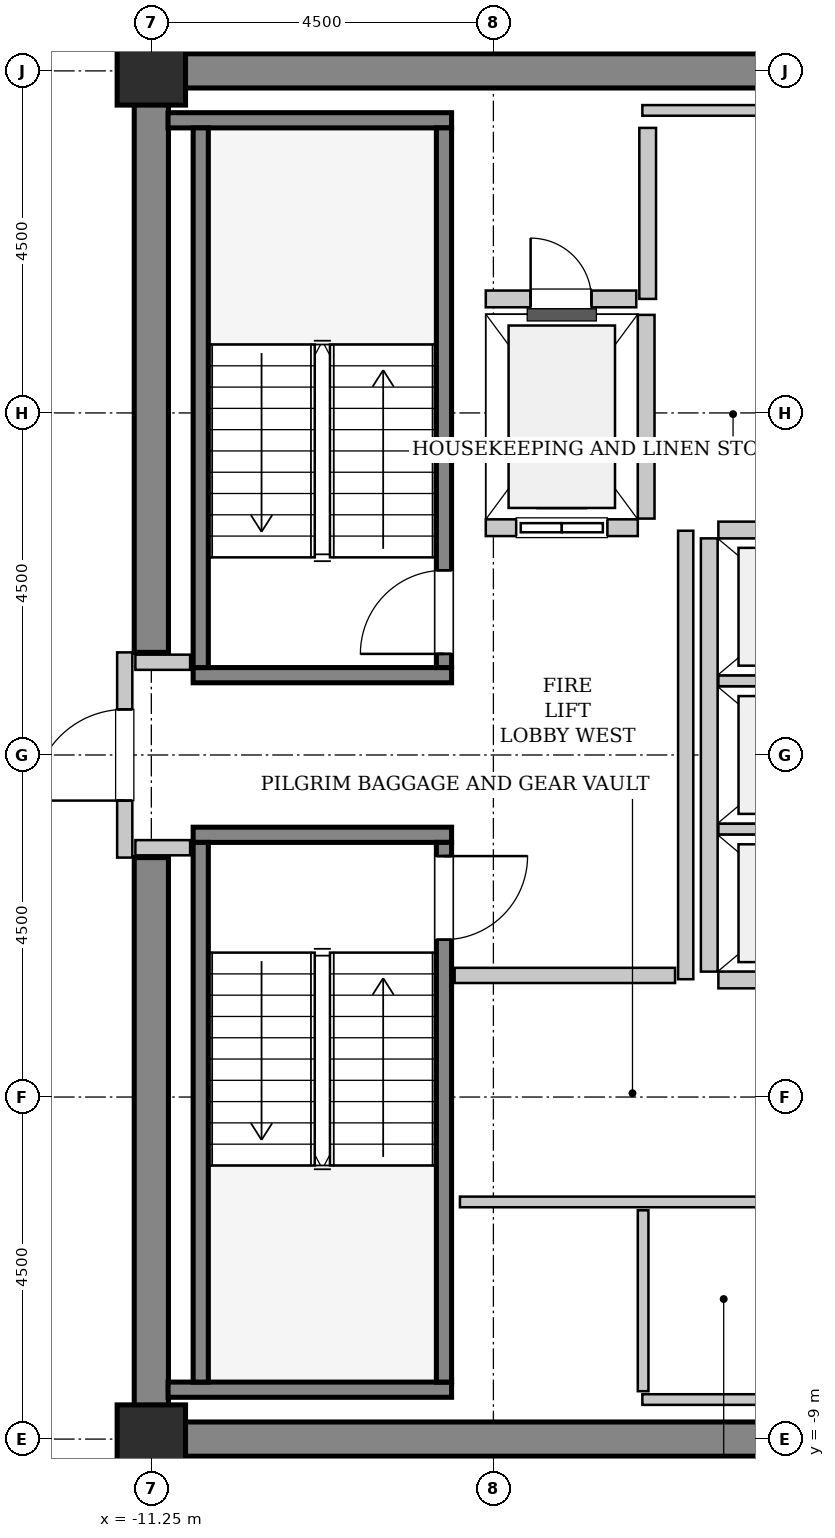
"""IFC4 building model, lengths in metres.
Left out: names, types, materials, properties, quantities, classifications, styles, units other than length and angle.
Written with IfcOpenShell. Run it as: python <this file> out.ifc"""

import sys

from ifc_helpers import new_model, si_unit, direction, frame, frame_2d, origin, origin_2d, place, context, subcontext, project, spatial, rectangle, extrude, source, transform, mapped, element, fill, save


model = new_model("IFC4")
c1 = context("Model", 3, precision=1e-05, world=origin(), true_north=direction((0.0, 1.0)))
c2 = subcontext(c1, "Body", "Model", "MODEL_VIEW")
j1 = project(units=[si_unit("LENGTHUNIT", "METRE"), si_unit("PLANEANGLEUNIT", "RADIAN")], contexts=[c1])
p1 = place(None, origin())
s1 = spatial("IfcSite", under=j1, at=p1, CompositionType="ELEMENT")
p2 = place(p1, origin())
s2 = spatial("IfcBuilding", under=s1, at=p2, CompositionType="ELEMENT")
p3 = place(p2, frame((0.0, 0.0, 306.4)))
s3 = spatial("IfcBuildingStorey", under=s2, at=p3, CompositionType="ELEMENT", Elevation=306.4)
m1 = source(origin(), c2, "Body", "SweptSolid", [
    extrude(rectangle(XDim=9.925, YDim=0.45, at=frame_2d((4.962, 0.0))), origin(), (0.0, 0.0, 1.0), 3.8),
])
for number, where, z_axis, x_axis in (
    (1, (-11.475, 9.0, 0.0), (0.0, 0.0, 1.0), (1.0, 0.0, 0.0)),
    (2, (-11.475, -9.0, 0.0), (0.0, 0.0, 1.0), (1.0, 0.0, 0.0)),
):
    element("IfcWall", number, at=place(p3, frame(where, z_axis=z_axis, x_axis=x_axis)), inside=s3, PredefinedType="SHEAR", context=c2, shape_type="MappedRepresentation", body=[
        mapped(m1, transform((0.0, 0.0, 0.0), x_axis=(1.0, 0.0, 0.0), y_axis=(0.0, 1.0, 0.0), z_axis=(0.0, 0.0, 1.0), scale=1.0)),
    ])
m2 = source(origin(), c2, "Body", "SweptSolid", [
    extrude(rectangle(XDim=7.425, YDim=0.45, at=frame_2d((3.712, 0.0))), origin(), (0.0, 0.0, 1.0), 3.8),
])
for number, where, z_axis, x_axis in (
    (3, (-11.25, -8.775, 0.0), (0.0, 0.0, 1.0), (0.0, 1.0, 0.0)),
    (4, (-11.25, 1.35, 0.0), (0.0, 0.0, 1.0), (0.0, 1.0, 0.0)),
):
    element("IfcWall", number, at=place(p3, frame(where, z_axis=z_axis, x_axis=x_axis)), inside=s3, PredefinedType="SHEAR", context=c2, shape_type="MappedRepresentation", body=[
        mapped(m2, transform((0.0, 0.0, 0.0), x_axis=(1.0, 0.0, 0.0), y_axis=(0.0, 1.0, 0.0), z_axis=(0.0, 0.0, 1.0), scale=1.0)),
    ])
m3 = source(origin(), c2, "Body", "SweptSolid", [
    extrude(rectangle(XDim=0.9, YDim=0.9, at=origin_2d()), origin(), (0.0, 0.0, 1.0), 3.8),
])
for number, where, z_axis, x_axis in (
    (5, (-11.25, -9.0, 0.0), (0.0, 0.0, 1.0), (1.0, 0.0, 0.0)),
    (6, (-11.25, 9.0, 0.0), (0.0, 0.0, 1.0), (1.0, 0.0, 0.0)),
):
    element("IfcColumn", number, at=place(p3, frame(where, z_axis=z_axis, x_axis=x_axis)), inside=s3, PredefinedType="COLUMN", context=c2, shape_type="MappedRepresentation", body=[
        mapped(m3, transform((0.0, 0.0, 0.0), x_axis=(1.0, 0.0, 0.0), y_axis=(0.0, 1.0, 0.0), z_axis=(0.0, 0.0, 1.0), scale=1.0)),
    ])
m4 = source(origin(), c2, "Body", "SweptSolid", [
    extrude(rectangle(XDim=3.4, YDim=0.2, at=frame_2d((1.7, 0.0))), origin(), (0.0, 0.0, 1.0), 3.8),
])
p4 = place(p3, frame((-7.3, 1.05, 0.0), z_axis=(0.0, 0.0, 1.0), x_axis=(-1.0, 0.0, 0.0)))
e7 = element("IfcWall", 7, at=p4, inside=s3, PredefinedType="SOLIDWALL", context=c2, shape_type="MappedRepresentation", body=[
    mapped(m4, transform((0.0, 0.0, 0.0), x_axis=(1.0, 0.0, 0.0), y_axis=(0.0, 1.0, 0.0), z_axis=(0.0, 0.0, 1.0), scale=1.0)),
])
m5 = source(origin(), c2, "Body", "SweptSolid", [
    extrude(rectangle(XDim=3.73, YDim=0.2, at=frame_2d((1.865, 0.0))), origin(), (0.0, 0.0, 1.0), 3.8),
])
p5 = place(p3, frame((-7.3, 8.35, 0.0), z_axis=(0.0, 0.0, 1.0), x_axis=(-1.0, 0.0, 0.0)))
e8 = element("IfcWall", 8, at=p5, inside=s3, PredefinedType="SOLIDWALL", context=c2, shape_type="MappedRepresentation", body=[
    mapped(m5, transform((0.0, 0.0, 0.0), x_axis=(1.0, 0.0, 0.0), y_axis=(0.0, 1.0, 0.0), z_axis=(0.0, 0.0, 1.0), scale=1.0)),
])
m6 = source(origin(), c2, "Body", "SweptSolid", [
    extrude(rectangle(XDim=7.1, YDim=0.2, at=frame_2d((3.55, 0.0))), origin(), (0.0, 0.0, 1.0), 3.8),
])
p6 = place(p3, frame((-7.4, 1.15, 0.0), z_axis=(0.0, 0.0, 1.0), x_axis=(0.0, 1.0, 0.0)))
e9 = element("IfcWall", 9, at=p6, inside=s3, PredefinedType="SOLIDWALL", context=c2, shape_type="MappedRepresentation", body=[
    mapped(m6, transform((0.0, 0.0, 0.0), x_axis=(1.0, 0.0, 0.0), y_axis=(0.0, 1.0, 0.0), z_axis=(0.0, 0.0, 1.0), scale=1.0)),
])
p7 = place(p6, frame((0.18, 0.0, 0.0)))
e10 = element("IfcOpeningElement", 10, at=p7, cuts=e9, PredefinedType="OPENING", context=c2, shape_type="SweptSolid", body=[
    extrude(rectangle(XDim=1.1, YDim=2.15, at=frame_2d((0.55, 1.075))), frame((0.0, 0.11, 0.0), z_axis=(0.0, -1.0, 0.0), x_axis=(1.0, 0.0, 0.0)), (0.0, 0.0, 1.0), 0.22),
])
p8 = place(p3, frame((-10.6, 1.15, 0.0), z_axis=(0.0, 0.0, 1.0), x_axis=(0.0, 1.0, 0.0)))
e11 = element("IfcWall", 11, at=p8, inside=s3, PredefinedType="SOLIDWALL", context=c2, shape_type="MappedRepresentation", body=[
    mapped(m6, transform((0.0, 0.0, 0.0), x_axis=(1.0, 0.0, 0.0), y_axis=(0.0, 1.0, 0.0), z_axis=(0.0, 0.0, 1.0), scale=1.0)),
])
p9 = place(p3, frame((-10.7, -1.05, 0.0), z_axis=(0.0, 0.0, 1.0), x_axis=(1.0, 0.0, 0.0)))
e12 = element("IfcWall", 12, at=p9, inside=s3, PredefinedType="SOLIDWALL", context=c2, shape_type="MappedRepresentation", body=[
    mapped(m4, transform((0.0, 0.0, 0.0), x_axis=(1.0, 0.0, 0.0), y_axis=(0.0, 1.0, 0.0), z_axis=(0.0, 0.0, 1.0), scale=1.0)),
])
p10 = place(p3, frame((-11.03, -8.35, 0.0), z_axis=(0.0, 0.0, 1.0), x_axis=(1.0, 0.0, 0.0)))
e13 = element("IfcWall", 13, at=p10, inside=s3, PredefinedType="SOLIDWALL", context=c2, shape_type="MappedRepresentation", body=[
    mapped(m5, transform((0.0, 0.0, 0.0), x_axis=(1.0, 0.0, 0.0), y_axis=(0.0, 1.0, 0.0), z_axis=(0.0, 0.0, 1.0), scale=1.0)),
])
p11 = place(p3, frame((-10.6, -1.15, 0.0), z_axis=(0.0, 0.0, 1.0), x_axis=(0.0, -1.0, 0.0)))
e14 = element("IfcWall", 14, at=p11, inside=s3, PredefinedType="SOLIDWALL", context=c2, shape_type="MappedRepresentation", body=[
    mapped(m6, transform((0.0, 0.0, 0.0), x_axis=(1.0, 0.0, 0.0), y_axis=(0.0, 1.0, 0.0), z_axis=(0.0, 0.0, 1.0), scale=1.0)),
])
p12 = place(p3, frame((-7.4, -1.15, 0.0), z_axis=(0.0, 0.0, 1.0), x_axis=(0.0, -1.0, 0.0)))
e15 = element("IfcWall", 15, at=p12, inside=s3, PredefinedType="SOLIDWALL", context=c2, shape_type="MappedRepresentation", body=[
    mapped(m6, transform((0.0, 0.0, 0.0), x_axis=(1.0, 0.0, 0.0), y_axis=(0.0, 1.0, 0.0), z_axis=(0.0, 0.0, 1.0), scale=1.0)),
])
p13 = place(p12, frame((0.18, 0.0, 0.0)))
e16 = element("IfcOpeningElement", 16, at=p13, cuts=e15, PredefinedType="OPENING", context=c2, shape_type="SweptSolid", body=[
    extrude(rectangle(XDim=1.1, YDim=2.15, at=frame_2d((0.55, 1.075))), frame((0.0, 0.11, 0.0), z_axis=(0.0, -1.0, 0.0), x_axis=(1.0, 0.0, 0.0)), (0.0, 0.0, 1.0), 0.22),
])
m7 = source(origin(), c2, "Body", "SweptSolid", [
    extrude(rectangle(XDim=2.0, YDim=0.22, at=frame_2d((1.0, 0.0))), origin(), (0.0, 0.0, 1.0), 3.535),
])
p14 = place(p3, frame((-6.85, 2.99, 0.0), z_axis=(0.0, 0.0, 1.0), x_axis=(1.0, 0.0, 0.0)))
e17 = element("IfcWall", 17, at=p14, inside=s3, PredefinedType="SOLIDWALL", context=c2, shape_type="MappedRepresentation", body=[
    mapped(m7, transform((0.0, 0.0, 0.0), x_axis=(1.0, 0.0, 0.0), y_axis=(0.0, 1.0, 0.0), z_axis=(0.0, 0.0, 1.0), scale=1.0)),
])
p15 = place(p14, frame((0.4, 0.0, 0.0)))
e18 = element("IfcOpeningElement", 18, at=p15, cuts=e17, PredefinedType="OPENING", context=c2, shape_type="SweptSolid", body=[
    extrude(rectangle(XDim=1.2, YDim=2.2, at=frame_2d((0.6, 1.1))), frame((0.0, 0.12, 0.0), z_axis=(0.0, -1.0, 0.0), x_axis=(1.0, 0.0, 0.0)), (0.0, 0.0, 1.0), 0.24),
])
m8 = source(origin(), c2, "Body", "SweptSolid", [
    extrude(rectangle(XDim=2.68, YDim=0.22, at=frame_2d((1.34, 0.0))), origin(), (0.0, 0.0, 1.0), 3.535),
])
p16 = place(p3, frame((-4.74, 3.11, 0.0), z_axis=(0.0, 0.0, 1.0), x_axis=(0.0, 1.0, 0.0)))
e19 = element("IfcWall", 19, at=p16, inside=s3, PredefinedType="SOLIDWALL", context=c2, shape_type="MappedRepresentation", body=[
    mapped(m8, transform((0.0, 0.0, 0.0), x_axis=(1.0, 0.0, 0.0), y_axis=(0.0, 1.0, 0.0), z_axis=(0.0, 0.0, 1.0), scale=1.0)),
])
m9 = source(origin(), c2, "Body", "SweptSolid", [
    extrude(rectangle(XDim=5.7, YDim=0.22, at=frame_2d((2.85, 0.0))), origin(), (0.0, 0.0, 1.0), 3.535),
])
p17 = place(p3, frame((-3.91, 2.85, 0.0), z_axis=(0.0, 0.0, 1.0), x_axis=(0.0, -1.0, 0.0)))
e20 = element("IfcWall", 20, at=p17, inside=s3, PredefinedType="SOLIDWALL", context=c2, shape_type="MappedRepresentation", body=[
    mapped(m9, transform((0.0, 0.0, 0.0), x_axis=(1.0, 0.0, 0.0), y_axis=(0.0, 1.0, 0.0), z_axis=(0.0, 0.0, 1.0), scale=1.0)),
])
m10 = source(origin(), c2, "Body", "SweptSolid", [
    extrude(rectangle(XDim=2.13, YDim=0.22, at=frame_2d((1.065, 0.0))), origin(), (0.0, 0.0, 1.0), 3.535),
])
p18 = place(p3, frame((-3.79, -2.96, 0.0), z_axis=(0.0, 0.0, 1.0), x_axis=(1.0, 0.0, 0.0)))
e21 = element("IfcWall", 21, at=p18, inside=s3, PredefinedType="SOLIDWALL", context=c2, shape_type="MappedRepresentation", body=[
    mapped(m10, transform((0.0, 0.0, 0.0), x_axis=(1.0, 0.0, 0.0), y_axis=(0.0, 1.0, 0.0), z_axis=(0.0, 0.0, 1.0), scale=1.0)),
])
m11 = source(origin(), c2, "Body", "SweptSolid", [
    extrude(rectangle(XDim=2.13, YDim=0.14, at=frame_2d((1.065, 0.0))), origin(), (0.0, 0.0, 1.0), 3.535),
])
for number, where, z_axis, x_axis in (
    (22, (-3.79, -0.975, 0.0), (0.0, 0.0, 1.0), (1.0, 0.0, 0.0)),
    (23, (-3.79, 0.975, 0.0), (0.0, 0.0, 1.0), (1.0, 0.0, 0.0)),
):
    element("IfcWall", number, at=place(p3, frame(where, z_axis=z_axis, x_axis=x_axis)), inside=s3, PredefinedType="PARTITIONING", context=c2, shape_type="MappedRepresentation", body=[
        mapped(m11, transform((0.0, 0.0, 0.0), x_axis=(1.0, 0.0, 0.0), y_axis=(0.0, 1.0, 0.0), z_axis=(0.0, 0.0, 1.0), scale=1.0)),
    ])
p19 = place(p3, frame((-1.66, 2.96, 0.0), z_axis=(0.0, 0.0, 1.0), x_axis=(-1.0, 0.0, 0.0)))
e24 = element("IfcWall", 24, at=p19, inside=s3, PredefinedType="SOLIDWALL", context=c2, shape_type="MappedRepresentation", body=[
    mapped(m10, transform((0.0, 0.0, 0.0), x_axis=(1.0, 0.0, 0.0), y_axis=(0.0, 1.0, 0.0), z_axis=(0.0, 0.0, 1.0), scale=1.0)),
])
m12 = source(origin(), c2, "Body", "SweptSolid", [
    extrude(rectangle(XDim=2.25, YDim=0.22, at=frame_2d((1.125, 0.0))), origin(), (0.0, 0.0, 1.0), 3.535),
])
p20 = place(p3, frame((-4.72, 6.0, 0.0), z_axis=(0.0, 0.0, 1.0), x_axis=(0.0, 1.0, 0.0)))
e25 = element("IfcWall", 25, at=p20, inside=s3, PredefinedType="SOLIDWALL", context=c2, shape_type="MappedRepresentation", body=[
    mapped(m12, transform((0.0, 0.0, 0.0), x_axis=(1.0, 0.0, 0.0), y_axis=(0.0, 1.0, 0.0), z_axis=(0.0, 0.0, 1.0), scale=1.0)),
])
m13 = source(origin(), c2, "Body", "SweptSolid", [
    extrude(rectangle(XDim=1.98, YDim=0.22, at=frame_2d((0.99, 0.0))), origin(), (0.0, 0.0, 1.0), 3.535),
])
p21 = place(p3, frame((-6.85, 6.0, 0.0), z_axis=(0.0, 0.0, 1.0), x_axis=(1.0, 0.0, 0.0)))
e26 = element("IfcWall", 26, at=p21, inside=s3, PredefinedType="SOLIDWALL", context=c2, shape_type="MappedRepresentation", body=[
    mapped(m13, transform((0.0, 0.0, 0.0), x_axis=(1.0, 0.0, 0.0), y_axis=(0.0, 1.0, 0.0), z_axis=(0.0, 0.0, 1.0), scale=1.0)),
])
p22 = place(p21, frame((0.59, 0.0, 0.0)))
e27 = element("IfcOpeningElement", 27, at=p22, cuts=e26, PredefinedType="OPENING", context=c2, shape_type="SweptSolid", body=[
    extrude(rectangle(XDim=0.8, YDim=2.0, at=frame_2d((0.4, 1.0))), frame((0.0, 0.12, 0.0), z_axis=(0.0, -1.0, 0.0), x_axis=(1.0, 0.0, 0.0)), (0.0, 0.0, 1.0), 0.24),
])
m14 = source(origin(), c2, "Body", "SweptSolid", [
    extrude(rectangle(XDim=2.7, YDim=0.2, at=frame_2d((1.35, 0.0))), origin(), (0.0, 0.0, 1.0), 2.625),
])
p23 = place(p3, frame((-11.6, -1.35, 0.0), z_axis=(0.0, 0.0, 1.0), x_axis=(0.0, 1.0, 0.0)))
e28 = element("IfcWall", 28, at=p23, inside=s3, PredefinedType="PARTITIONING", context=c2, shape_type="MappedRepresentation", body=[
    mapped(m14, transform((0.0, 0.0, 0.0), x_axis=(1.0, 0.0, 0.0), y_axis=(0.0, 1.0, 0.0), z_axis=(0.0, 0.0, 1.0), scale=1.0)),
])
p24 = place(p23, frame((0.75, 0.0, 0.0)))
e29 = element("IfcOpeningElement", 29, at=p24, cuts=e28, PredefinedType="OPENING", context=c2, shape_type="SweptSolid", body=[
    extrude(rectangle(XDim=1.2, YDim=2.15, at=frame_2d((0.6, 1.075))), frame((0.0, 0.11, 0.0), z_axis=(0.0, -1.0, 0.0), x_axis=(1.0, 0.0, 0.0)), (0.0, 0.0, 1.0), 0.22),
])
m15 = source(origin(), c2, "Body", "SweptSolid", [
    extrude(rectangle(XDim=5.9, YDim=0.2, at=frame_2d((2.95, 0.0))), origin(), (0.0, 0.0, 1.0), 3.535),
])
p25 = place(p3, frame((-4.22, -2.95, 0.0), z_axis=(0.0, 0.0, 1.0), x_axis=(0.0, 1.0, 0.0)))
e30 = element("IfcWall", 30, at=p25, inside=s3, PredefinedType="PARTITIONING", context=c2, shape_type="MappedRepresentation", body=[
    mapped(m15, transform((0.0, 0.0, 0.0), x_axis=(1.0, 0.0, 0.0), y_axis=(0.0, 1.0, 0.0), z_axis=(0.0, 0.0, 1.0), scale=1.0)),
])
m16 = source(origin(), c2, "Body", "SweptSolid", [
    extrude(rectangle(XDim=2.9, YDim=0.2, at=frame_2d((1.45, 0.0))), origin(), (0.0, 0.0, 1.0), 3.535),
])
p26 = place(p3, frame((-7.26, -2.9, 0.0), z_axis=(0.0, 0.0, 1.0), x_axis=(1.0, 0.0, 0.0)))
e31 = element("IfcWall", 31, at=p26, inside=s3, PredefinedType="PARTITIONING", context=c2, shape_type="MappedRepresentation", body=[
    mapped(m16, transform((0.0, 0.0, 0.0), x_axis=(1.0, 0.0, 0.0), y_axis=(0.0, 1.0, 0.0), z_axis=(0.0, 0.0, 1.0), scale=1.0)),
])
m17 = source(origin(), c2, "Body", "SweptSolid", [
    extrude(rectangle(XDim=0.72, YDim=0.2, at=frame_2d((0.36, 0.0))), origin(), (0.0, 0.0, 1.0), 3.535),
])
for number, where, z_axis, x_axis in (
    (32, (-11.46, 1.22, 0.0), (0.0, 0.0, 1.0), (1.0, 0.0, 0.0)),
    (33, (-11.46, -1.22, 0.0), (0.0, 0.0, 1.0), (1.0, 0.0, 0.0)),
):
    element("IfcWall", number, at=place(p3, frame(where, z_axis=z_axis, x_axis=x_axis)), inside=s3, PredefinedType="PARTITIONING", context=c2, shape_type="MappedRepresentation", body=[
        mapped(m17, transform((0.0, 0.0, 0.0), x_axis=(1.0, 0.0, 0.0), y_axis=(0.0, 1.0, 0.0), z_axis=(0.0, 0.0, 1.0), scale=1.0)),
    ])
m18 = source(origin(), c2, "Body", "SweptSolid", [
    extrude(rectangle(XDim=3.15, YDim=0.14, at=frame_2d((1.575, 0.0))), origin(), (0.0, 0.0, 1.0), 3.535),
])
p27 = place(p3, frame((-4.79, 8.48, 0.0), z_axis=(0.0, 0.0, 1.0), x_axis=(1.0, 0.0, 0.0)))
e34 = element("IfcWall", 34, at=p27, inside=s3, PredefinedType="PARTITIONING", context=c2, shape_type="MappedRepresentation", body=[
    mapped(m18, transform((0.0, 0.0, 0.0), x_axis=(1.0, 0.0, 0.0), y_axis=(0.0, 1.0, 0.0), z_axis=(0.0, 0.0, 1.0), scale=1.0)),
])
m19 = source(origin(), c2, "Body", "SweptSolid", [
    extrude(rectangle(XDim=5.55, YDim=0.14, at=frame_2d((2.775, 0.0))), origin(), (0.0, 0.0, 1.0), 3.535),
])
p28 = place(p3, frame((-7.19, -5.88, 0.0), z_axis=(0.0, 0.0, 1.0), x_axis=(1.0, 0.0, 0.0)))
e35 = element("IfcWall", 35, at=p28, inside=s3, PredefinedType="PARTITIONING", context=c2, shape_type="MappedRepresentation", body=[
    mapped(m19, transform((0.0, 0.0, 0.0), x_axis=(1.0, 0.0, 0.0), y_axis=(0.0, 1.0, 0.0), z_axis=(0.0, 0.0, 1.0), scale=1.0)),
])
p29 = place(p3, frame((-4.79, -8.48, 0.0), z_axis=(0.0, 0.0, 1.0), x_axis=(1.0, 0.0, 0.0)))
e36 = element("IfcWall", 36, at=p29, inside=s3, PredefinedType="PARTITIONING", context=c2, shape_type="MappedRepresentation", body=[
    mapped(m18, transform((0.0, 0.0, 0.0), x_axis=(1.0, 0.0, 0.0), y_axis=(0.0, 1.0, 0.0), z_axis=(0.0, 0.0, 1.0), scale=1.0)),
])
m20 = source(origin(), c2, "Body", "SweptSolid", [
    extrude(rectangle(XDim=2.38, YDim=0.14, at=frame_2d((1.19, 0.0))), origin(), (0.0, 0.0, 1.0), 3.535),
])
p30 = place(p3, frame((-4.78, -8.37, 0.0), z_axis=(0.0, 0.0, 1.0), x_axis=(0.0, 1.0, 0.0)))
e37 = element("IfcWall", 37, at=p30, inside=s3, PredefinedType="PARTITIONING", context=c2, shape_type="MappedRepresentation", body=[
    mapped(m20, transform((0.0, 0.0, 0.0), x_axis=(1.0, 0.0, 0.0), y_axis=(0.0, 1.0, 0.0), z_axis=(0.0, 0.0, 1.0), scale=1.0)),
])
m21 = source(origin(), c2, "Body", "SweptSolid", [
    extrude(rectangle(XDim=1.1, YDim=2.15, at=frame_2d((0.55, 1.075))), frame((0.0, 0.025, 0.0), z_axis=(0.0, -1.0, 0.0), x_axis=(1.0, 0.0, 0.0)), (0.0, 0.0, 1.0), 0.05),
])
p31 = place(p7, origin())
e38 = element("IfcDoor", 38, at=p31, inside=s3, OperationType="SINGLE_SWING_LEFT", PredefinedType="DOOR", context=c2, shape_type="MappedRepresentation", body=[
    mapped(m21, transform((0.0, 0.0, 0.0), x_axis=(1.0, 0.0, 0.0), y_axis=(0.0, 1.0, 0.0), z_axis=(0.0, 0.0, 1.0), scale=1.0)),
])
fill(e10, e38)
p32 = place(p13, origin())
e39 = element("IfcDoor", 39, at=p32, inside=s3, OperationType="SINGLE_SWING_LEFT", PredefinedType="DOOR", context=c2, shape_type="MappedRepresentation", body=[
    mapped(m21, transform((0.0, 0.0, 0.0), x_axis=(1.0, 0.0, 0.0), y_axis=(0.0, 1.0, 0.0), z_axis=(0.0, 0.0, 1.0), scale=1.0)),
])
fill(e16, e39)
m22 = source(origin(), c2, "Body", "SweptSolid", [
    extrude(rectangle(XDim=1.2, YDim=2.2, at=frame_2d((0.6, 1.1))), frame((0.0, 0.025, 0.0), z_axis=(0.0, -1.0, 0.0), x_axis=(1.0, 0.0, 0.0)), (0.0, 0.0, 1.0), 0.05),
])
p33 = place(p15, origin())
e40 = element("IfcDoor", 40, at=p33, inside=s3, OperationType="SLIDING_TO_LEFT", PredefinedType="DOOR", context=c2, shape_type="MappedRepresentation", body=[
    mapped(m22, transform((0.0, 0.0, 0.0), x_axis=(1.0, 0.0, 0.0), y_axis=(0.0, 1.0, 0.0), z_axis=(0.0, 0.0, 1.0), scale=1.0)),
])
fill(e18, e40)
m23 = source(origin(), c2, "Body", "SweptSolid", [
    extrude(rectangle(XDim=0.8, YDim=2.0, at=frame_2d((0.4, 1.0))), frame((0.0, 0.025, 0.0), z_axis=(0.0, -1.0, 0.0), x_axis=(1.0, 0.0, 0.0)), (0.0, 0.0, 1.0), 0.05),
])
p34 = place(p22, origin())
e41 = element("IfcDoor", 41, at=p34, inside=s3, OperationType="SINGLE_SWING_LEFT", PredefinedType="TRAPDOOR", context=c2, shape_type="MappedRepresentation", body=[
    mapped(m23, transform((0.0, 0.0, 0.0), x_axis=(1.0, 0.0, 0.0), y_axis=(0.0, 1.0, 0.0), z_axis=(0.0, 0.0, 1.0), scale=1.0)),
])
fill(e27, e41)
m24 = source(origin(), c2, "Body", "SweptSolid", [
    extrude(rectangle(XDim=1.2, YDim=2.15, at=frame_2d((0.6, 1.075))), frame((0.0, 0.025, 0.0), z_axis=(0.0, -1.0, 0.0), x_axis=(1.0, 0.0, 0.0)), (0.0, 0.0, 1.0), 0.05),
])
p35 = place(p24, origin())
e42 = element("IfcDoor", 42, at=p35, inside=s3, OperationType="SINGLE_SWING_LEFT", PredefinedType="DOOR", context=c2, shape_type="MappedRepresentation", body=[
    mapped(m24, transform((0.0, 0.0, 0.0), x_axis=(1.0, 0.0, 0.0), y_axis=(0.0, 1.0, 0.0), z_axis=(0.0, 0.0, 1.0), scale=1.0)),
])
fill(e29, e42)
save(model, sys.argv[1])
